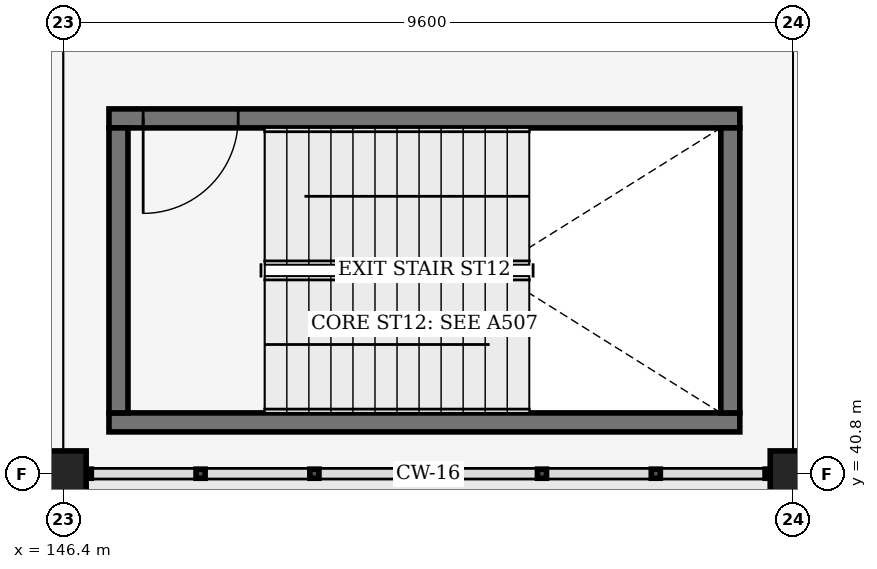
"""IFC4 building model, lengths in metres.
Left out: names, types, materials, properties, quantities, classifications, styles, units other than length and angle.
Written with IfcOpenShell. Run it as: python <this file> out.ifc"""

import sys

from ifc_helpers import new_model, si_unit, direction, frame, frame_2d, origin, origin_2d, place, context, subcontext, project, spatial, rectangle, extrude, element, fill, save


model = new_model("IFC4")
c1 = context("Model", 3, precision=1e-05, world=origin(), true_north=direction((0.0, 1.0)))
c2 = subcontext(c1, "Body", "Model", "MODEL_VIEW")
j1 = project(units=[si_unit("LENGTHUNIT", "METRE"), si_unit("PLANEANGLEUNIT", "RADIAN")], contexts=[c1])
p1 = place(None, origin())
s1 = spatial("IfcSite", under=j1, at=p1, CompositionType="ELEMENT")
p2 = place(p1, origin())
s2 = spatial("IfcBuilding", under=s1, at=p2, CompositionType="ELEMENT")
p3 = place(p2, frame((0.0, 0.0, 10.5)))
s3 = spatial("IfcBuildingStorey", under=s2, at=p3, CompositionType="ELEMENT", Elevation=10.5)
for number, where, z_axis, x_axis in (
    (1, (146.4, 40.8, 0.0), (0.0, 0.0, 1.0), (1.0, 0.0, 0.0)),
    (2, (156.0, 40.8, 0.0), (0.0, 0.0, 1.0), (1.0, 0.0, 0.0)),
):
    element("IfcColumn", number, at=place(p3, frame(where, z_axis=z_axis, x_axis=x_axis)), inside=s3, PredefinedType="COLUMN", context=c2, shape_type="SweptSolid", body=[
        extrude(rectangle(XDim=0.6, YDim=0.6, at=origin_2d()), origin(), (0.0, 0.0, 1.0), 4.8),
    ])
p4 = place(p3, frame((147.0, 41.475, 0.0), z_axis=(0.0, 0.0, 1.0), x_axis=(1.0, 0.0, 0.0)))
e3 = element("IfcWall", 3, at=p4, inside=s3, PredefinedType="SHEAR", context=c2, shape_type="SweptSolid", body=[
    extrude(rectangle(XDim=8.3, YDim=0.25, at=frame_2d((4.15, 0.0))), origin(), (0.0, 0.0, 1.0), 4.49),
])
p5 = place(p3, frame((155.3, 45.475, 0.0), z_axis=(0.0, 0.0, 1.0), x_axis=(-1.0, 0.0, 0.0)))
e4 = element("IfcWall", 4, at=p5, inside=s3, PredefinedType="SHEAR", context=c2, shape_type="SweptSolid", body=[
    extrude(rectangle(XDim=8.3, YDim=0.25, at=frame_2d((4.15, 0.0))), origin(), (0.0, 0.0, 1.0), 4.49),
])
p6 = place(p5, frame((7.85, 0.0, 0.0), z_axis=(0.0, 0.0, 1.0), x_axis=(-1.0, 0.0, 0.0)))
e5 = element("IfcOpeningElement", 5, at=p6, cuts=e4, PredefinedType="OPENING", context=c2, shape_type="SweptSolid", body=[
    extrude(rectangle(XDim=1.25, YDim=2.2, at=frame_2d((0.625, 1.1))), frame((0.0, 0.135, 0.0), z_axis=(0.0, -1.0, 0.0), x_axis=(1.0, 0.0, 0.0)), (0.0, 0.0, 1.0), 0.27),
])
for number, where, z_axis, x_axis in (
    (6, (147.125, 45.35, 0.0), (0.0, 0.0, 1.0), (0.0, -1.0, 0.0)),
    (7, (155.175, 41.6, 0.0), (0.0, 0.0, 1.0), (0.0, 1.0, 0.0)),
):
    element("IfcWall", number, at=place(p3, frame(where, z_axis=z_axis, x_axis=x_axis)), inside=s3, PredefinedType="SHEAR", context=c2, shape_type="SweptSolid", body=[
        extrude(rectangle(XDim=3.75, YDim=0.25, at=frame_2d((1.875, 0.0))), origin(), (0.0, 0.0, 1.0), 4.49),
    ])
p7 = place(p6, origin())
e8 = element("IfcDoor", 8, at=p7, inside=s3, OperationType="SINGLE_SWING_LEFT", PredefinedType="DOOR", context=c2, shape_type="SweptSolid", body=[
    extrude(rectangle(XDim=1.25, YDim=2.2, at=frame_2d((0.625, 1.1))), frame((0.0, 0.025, 0.0), z_axis=(0.0, -1.0, 0.0), x_axis=(1.0, 0.0, 0.0)), (0.0, 0.0, 1.0), 0.05),
])
fill(e5, e8)
save(model, sys.argv[1])
